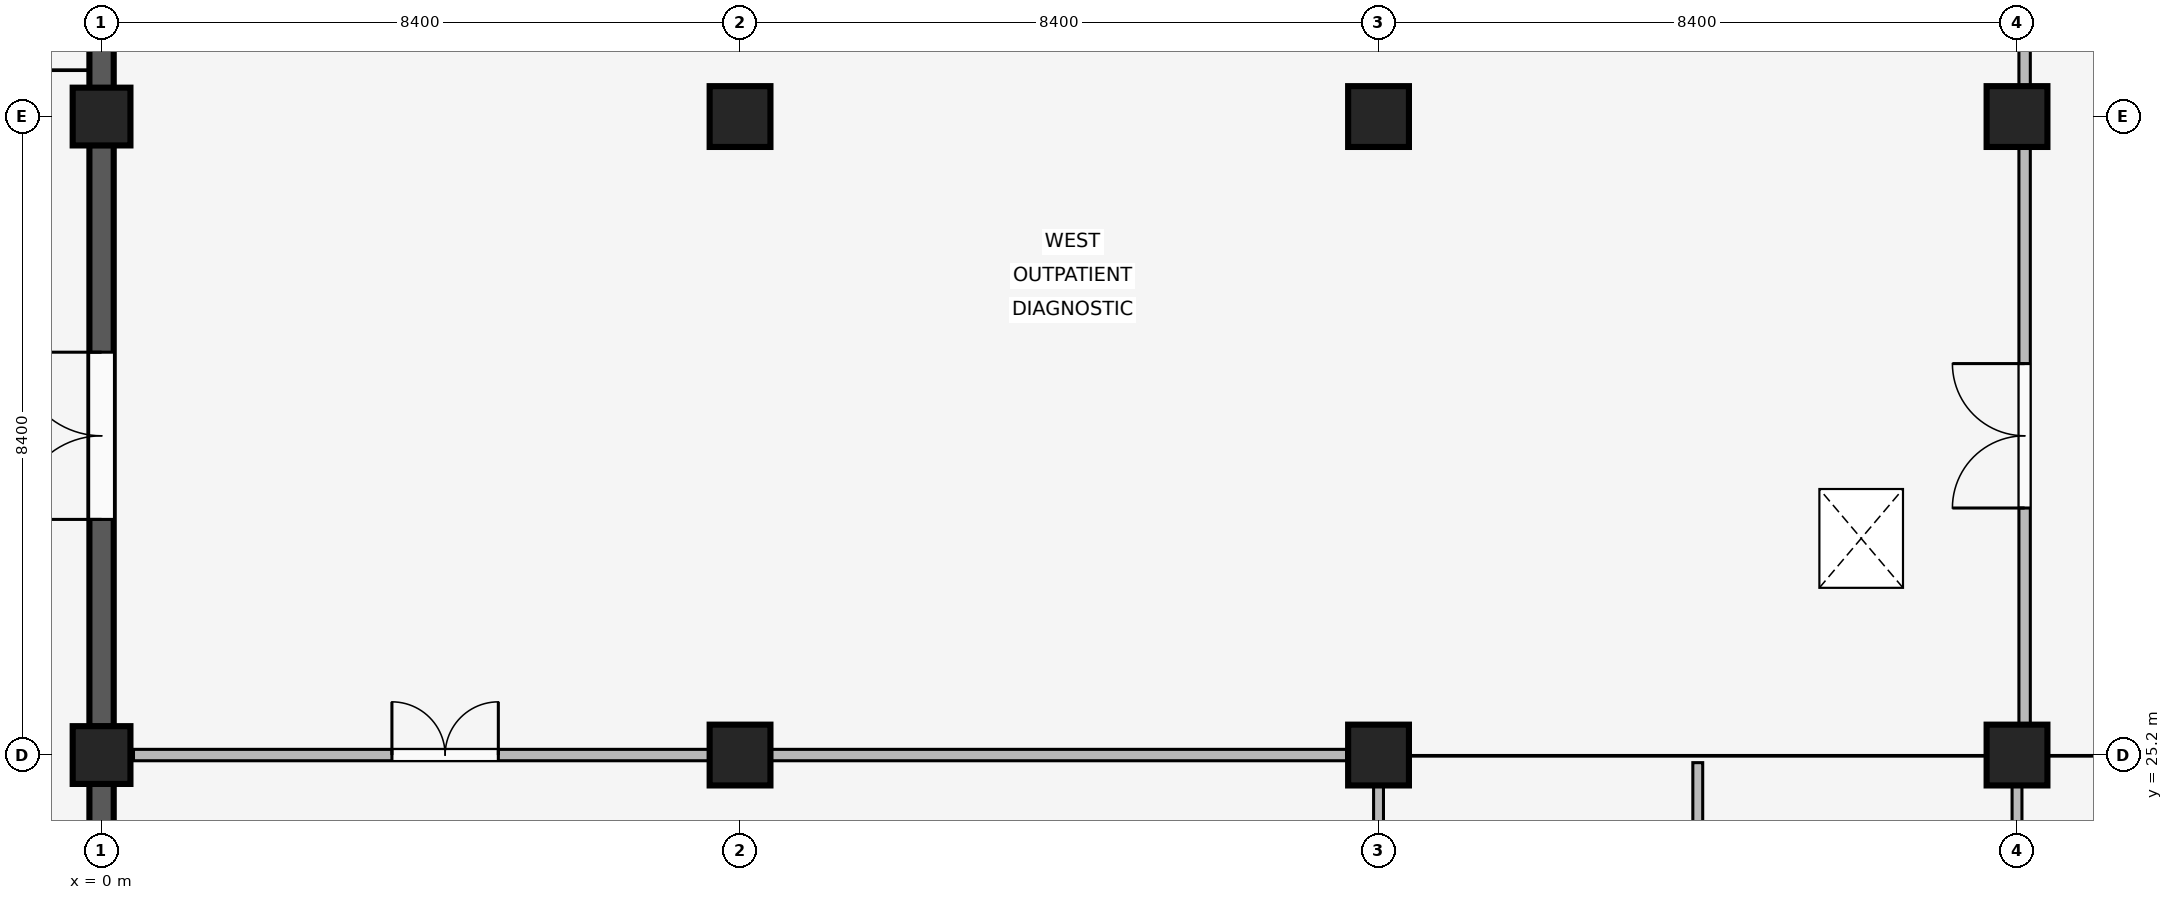
"""IFC4 building model, lengths in metres.
Left out: names, types, materials, properties, quantities, classifications, styles, units other than length and angle.
Written with IfcOpenShell. Run it as: python <this file> out.ifc"""

import sys

from ifc_helpers import new_model, si_unit, direction, frame, frame_2d, origin, origin_2d, place, context, subcontext, project, spatial, rectangle, extrude, element, fill, save


model = new_model("IFC4")
c1 = context("Model", 3, precision=1e-05, world=origin(), true_north=direction((0.0, 1.0)))
c2 = subcontext(c1, "Body", "Model", "MODEL_VIEW")
j1 = project(units=[si_unit("LENGTHUNIT", "METRE"), si_unit("PLANEANGLEUNIT", "RADIAN")], contexts=[c1])
p1 = place(None, origin())
s1 = spatial("IfcSite", under=j1, at=p1, CompositionType="ELEMENT")
p2 = place(p1, origin())
s2 = spatial("IfcBuilding", under=s1, at=p2, CompositionType="ELEMENT")
p3 = place(p2, origin())
s3 = spatial("IfcBuildingStorey", under=s2, at=p3, CompositionType="ELEMENT", Elevation=0.0)
for number, where, z_axis, x_axis in (
    (1, (0.0, 25.2, 0.0), (0.0, 0.0, 1.0), (1.0, 0.0, 0.0)),
    (2, (0.0, 33.6, 0.0), (0.0, 0.0, 1.0), (1.0, 0.0, 0.0)),
):
    element("IfcColumn", number, at=place(p3, frame(where, z_axis=z_axis, x_axis=x_axis)), inside=s3, PredefinedType="COLUMN", context=c2, shape_type="SweptSolid", body=[
        extrude(rectangle(XDim=0.76, YDim=0.76, at=origin_2d()), origin(), (0.0, 0.0, 1.0), 4.8),
    ])
for number, where, z_axis, x_axis in (
    (3, (8.4, 25.2, 0.0), (0.0, 0.0, 1.0), (1.0, 0.0, 0.0)),
    (4, (8.4, 33.6, 0.0), (0.0, 0.0, 1.0), (1.0, 0.0, 0.0)),
    (5, (16.8, 25.2, 0.0), (0.0, 0.0, 1.0), (1.0, 0.0, 0.0)),
    (6, (16.8, 33.6, 0.0), (0.0, 0.0, 1.0), (1.0, 0.0, 0.0)),
    (7, (25.2, 25.2, 0.0), (0.0, 0.0, 1.0), (1.0, 0.0, 0.0)),
    (8, (25.2, 33.6, 0.0), (0.0, 0.0, 1.0), (1.0, 0.0, 0.0)),
):
    element("IfcColumn", number, at=place(p3, frame(where, z_axis=z_axis, x_axis=x_axis)), inside=s3, PredefinedType="COLUMN", context=c2, shape_type="SweptSolid", body=[
        extrude(rectangle(XDim=0.8, YDim=0.8, at=origin_2d()), origin(), (0.0, 0.0, 1.0), 4.8),
    ])
p4 = place(p3, frame((0.0, 17.175, 0.0), z_axis=(0.0, 0.0, 1.0), x_axis=(0.0, 1.0, 0.0)))
e9 = element("IfcWall", 9, at=p4, inside=s3, PredefinedType="SOLIDWALL", context=c2, shape_type="SweptSolid", body=[
    extrude(rectangle(XDim=7.65, YDim=0.32, at=frame_2d((3.825, 0.0))), origin(), (0.0, 0.0, 1.0), 3.82),
])
p5 = place(p4, frame((1.385, 0.0, 0.85)))
e10 = element("IfcOpeningElement", 10, at=p5, cuts=e9, PredefinedType="OPENING", context=c2, shape_type="SweptSolid", body=[
    extrude(rectangle(XDim=0.75, YDim=1.85, at=frame_2d((0.375, 0.925))), frame((0.0, 0.17, 0.0), z_axis=(0.0, -1.0, 0.0), x_axis=(1.0, 0.0, 0.0)), (0.0, 0.0, 1.0), 0.34),
])
p6 = place(p4, frame((5.515, 0.0, 0.85)))
e11 = element("IfcOpeningElement", 11, at=p6, cuts=e9, PredefinedType="OPENING", context=c2, shape_type="SweptSolid", body=[
    extrude(rectangle(XDim=0.75, YDim=1.85, at=frame_2d((0.375, 0.925))), frame((0.0, 0.17, 0.0), z_axis=(0.0, -1.0, 0.0), x_axis=(1.0, 0.0, 0.0)), (0.0, 0.0, 1.0), 0.34),
])
p7 = place(p3, frame((0.0, 25.575, 0.0), z_axis=(0.0, 0.0, 1.0), x_axis=(0.0, 1.0, 0.0)))
e12 = element("IfcWall", 12, at=p7, inside=s3, PredefinedType="SOLIDWALL", context=c2, shape_type="SweptSolid", body=[
    extrude(rectangle(XDim=7.65, YDim=0.32, at=frame_2d((3.825, 0.0))), origin(), (0.0, 0.0, 1.0), 3.82),
])
p8 = place(p7, frame((2.725, 0.0, 0.0)))
e13 = element("IfcOpeningElement", 13, at=p8, cuts=e12, PredefinedType="OPENING", context=c2, shape_type="SweptSolid", body=[
    extrude(rectangle(XDim=2.2, YDim=2.55, at=frame_2d((1.1, 1.275))), frame((0.0, 0.17, 0.0), z_axis=(0.0, -1.0, 0.0), x_axis=(1.0, 0.0, 0.0)), (0.0, 0.0, 1.0), 0.34),
])
p9 = place(p3, frame((0.0, 33.975, 0.0), z_axis=(0.0, 0.0, 1.0), x_axis=(0.0, 1.0, 0.0)))
e14 = element("IfcWall", 14, at=p9, inside=s3, PredefinedType="SOLIDWALL", context=c2, shape_type="SweptSolid", body=[
    extrude(rectangle(XDim=7.65, YDim=0.32, at=frame_2d((3.825, 0.0))), origin(), (0.0, 0.0, 1.0), 3.82),
])
p10 = place(p9, frame((1.284, 0.0, 0.85)))
e15 = element("IfcOpeningElement", 15, at=p10, cuts=e14, PredefinedType="OPENING", context=c2, shape_type="SweptSolid", body=[
    extrude(rectangle(XDim=0.95, YDim=1.6, at=frame_2d((0.475, 0.8))), frame((0.0, 0.17, 0.0), z_axis=(0.0, -1.0, 0.0), x_axis=(1.0, 0.0, 0.0)), (0.0, 0.0, 1.0), 0.34),
])
p11 = place(p9, frame((5.416, 0.0, 0.85)))
e16 = element("IfcOpeningElement", 16, at=p11, cuts=e14, PredefinedType="OPENING", context=c2, shape_type="SweptSolid", body=[
    extrude(rectangle(XDim=0.95, YDim=1.6, at=frame_2d((0.475, 0.8))), frame((0.0, 0.17, 0.0), z_axis=(0.0, -1.0, 0.0), x_axis=(1.0, 0.0, 0.0)), (0.0, 0.0, 1.0), 0.34),
])
p12 = place(p3, frame((16.8, 14.12, 0.0), z_axis=(0.0, 0.0, 1.0), x_axis=(0.0, 1.0, 0.0)))
e17 = element("IfcWall", 17, at=p12, inside=s3, PredefinedType="PARTITIONING", context=c2, shape_type="SweptSolid", body=[
    extrude(rectangle(XDim=10.94, YDim=0.13, at=frame_2d((5.47, 0.0))), origin(), (0.0, 0.0, 1.0), 3.8),
])
p13 = place(p3, frame((21.0, 14.17, 0.0), z_axis=(0.0, 0.0, 1.0), x_axis=(0.0, 1.0, 0.0)))
e18 = element("IfcWall", 18, at=p13, inside=s3, PredefinedType="PARTITIONING", context=c2, shape_type="SweptSolid", body=[
    extrude(rectangle(XDim=10.93, YDim=0.13, at=frame_2d((5.465, 0.0))), origin(), (0.0, 0.0, 1.0), 3.8),
])
p14 = place(p3, frame((25.2, 14.12, 0.0), z_axis=(0.0, 0.0, 1.0), x_axis=(0.0, 1.0, 0.0)))
e19 = element("IfcWall", 19, at=p14, inside=s3, PredefinedType="PARTITIONING", context=c2, shape_type="SweptSolid", body=[
    extrude(rectangle(XDim=10.94, YDim=0.13, at=frame_2d((5.47, 0.0))), origin(), (0.0, 0.0, 1.0), 3.8),
])
p15 = place(p3, frame((0.42, 25.2, 0.0), z_axis=(0.0, 0.0, 1.0), x_axis=(1.0, 0.0, 0.0)))
e20 = element("IfcWall", 20, at=p15, inside=s3, PredefinedType="PARTITIONING", context=c2, shape_type="SweptSolid", body=[
    extrude(rectangle(XDim=15.96, YDim=0.15, at=frame_2d((7.98, 0.0))), origin(), (0.0, 0.0, 1.0), 3.8),
])
p16 = place(p15, frame((3.4, 0.0, 0.0)))
e21 = element("IfcOpeningElement", 21, at=p16, cuts=e20, PredefinedType="OPENING", context=c2, shape_type="SweptSolid", body=[
    extrude(rectangle(XDim=1.4, YDim=2.25, at=frame_2d((0.7, 1.125))), frame((0.0, 0.085, 0.0), z_axis=(0.0, -1.0, 0.0), x_axis=(1.0, 0.0, 0.0)), (0.0, 0.0, 1.0), 0.17),
])
p17 = place(p3, frame((25.3, 25.6, 0.0), z_axis=(0.0, 0.0, 1.0), x_axis=(0.0, 1.0, 0.0)))
e22 = element("IfcWall", 22, at=p17, inside=s3, PredefinedType="PARTITIONING", context=c2, shape_type="SweptSolid", body=[
    extrude(rectangle(XDim=7.6, YDim=0.15, at=frame_2d((3.8, 0.0))), origin(), (0.0, 0.0, 1.0), 3.8),
])
p18 = place(p17, frame((2.85, 0.0, 0.0)))
e23 = element("IfcOpeningElement", 23, at=p18, cuts=e22, PredefinedType="OPENING", context=c2, shape_type="SweptSolid", body=[
    extrude(rectangle(XDim=1.9, YDim=2.4, at=frame_2d((0.95, 1.2))), frame((0.0, 0.085, 0.0), z_axis=(0.0, -1.0, 0.0), x_axis=(1.0, 0.0, 0.0)), (0.0, 0.0, 1.0), 0.17),
])
p19 = place(p3, frame((25.3, 34.0, 0.0), z_axis=(0.0, 0.0, 1.0), x_axis=(0.0, 1.0, 0.0)))
e24 = element("IfcWall", 24, at=p19, inside=s3, PredefinedType="PARTITIONING", context=c2, shape_type="SweptSolid", body=[
    extrude(rectangle(XDim=16.0, YDim=0.15, at=frame_2d((8.0, 0.0))), origin(), (0.0, 0.0, 1.0), 3.8),
])
p20 = place(p19, frame((3.4, 0.0, 0.0)))
e25 = element("IfcOpeningElement", 25, at=p20, cuts=e24, PredefinedType="OPENING", context=c2, shape_type="SweptSolid", body=[
    extrude(rectangle(XDim=1.55, YDim=2.3, at=frame_2d((0.775, 1.15))), frame((0.0, 0.085, 0.0), z_axis=(0.0, -1.0, 0.0), x_axis=(1.0, 0.0, 0.0)), (0.0, 0.0, 1.0), 0.17),
])
p21 = place(p8, origin())
e26 = element("IfcDoor", 26, at=p21, inside=s3, OperationType="DOUBLE_SWING_LEFT", PredefinedType="DOOR", context=c2, shape_type="SweptSolid", body=[
    extrude(rectangle(XDim=2.2, YDim=2.55, at=frame_2d((1.1, 1.275))), frame((0.0, 0.025, 0.0), z_axis=(0.0, -1.0, 0.0), x_axis=(1.0, 0.0, 0.0)), (0.0, 0.0, 1.0), 0.05),
])
fill(e13, e26)
p22 = place(p16, origin())
e27 = element("IfcDoor", 27, at=p22, inside=s3, OperationType="DOUBLE_SWING_LEFT", PredefinedType="DOOR", context=c2, shape_type="SweptSolid", body=[
    extrude(rectangle(XDim=1.4, YDim=2.25, at=frame_2d((0.7, 1.125))), frame((0.0, 0.025, 0.0), z_axis=(0.0, -1.0, 0.0), x_axis=(1.0, 0.0, 0.0)), (0.0, 0.0, 1.0), 0.05),
])
fill(e21, e27)
p23 = place(p18, origin())
e28 = element("IfcDoor", 28, at=p23, inside=s3, OperationType="DOUBLE_SWING_LEFT", PredefinedType="DOOR", context=c2, shape_type="SweptSolid", body=[
    extrude(rectangle(XDim=1.9, YDim=2.4, at=frame_2d((0.95, 1.2))), frame((0.0, 0.025, 0.0), z_axis=(0.0, -1.0, 0.0), x_axis=(1.0, 0.0, 0.0)), (0.0, 0.0, 1.0), 0.05),
])
fill(e23, e28)
save(model, sys.argv[1])
